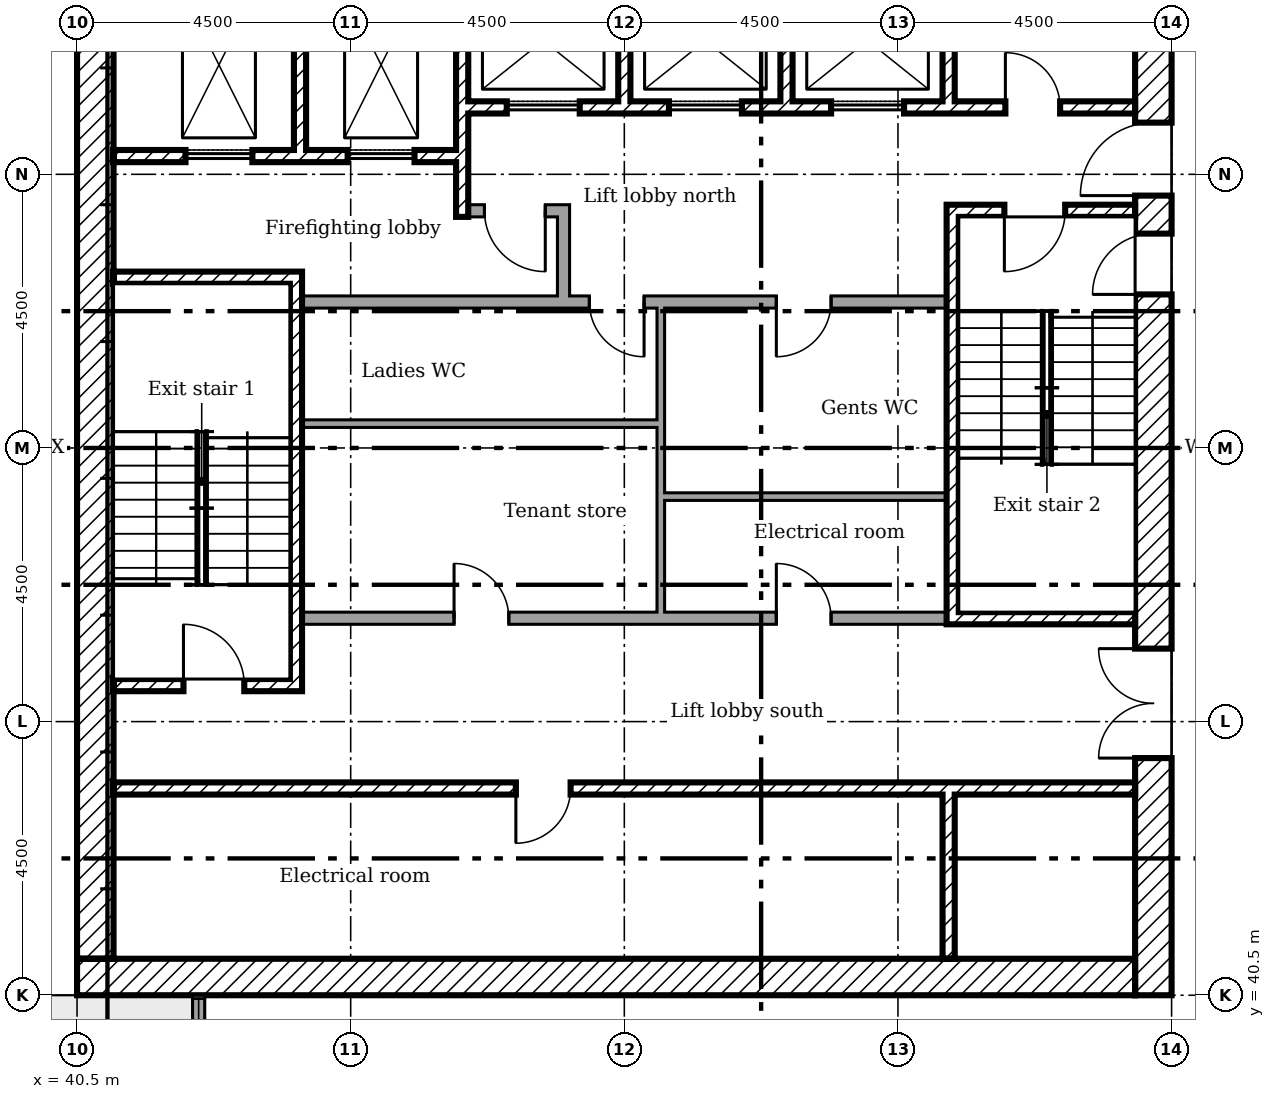
"""IFC4 building model, lengths in metres.
Left out: names, types, materials, properties, quantities, classifications, styles, units other than length and angle.
Written with IfcOpenShell. Run it as: python <this file> out.ifc"""

import sys

from ifc_helpers import new_model, si_unit, direction, frame, frame_2d, origin, place, context, subcontext, project, spatial, rectangle, extrude, element, fill, save


model = new_model("IFC4")
c1 = context("Model", 3, precision=1e-05, world=origin(), true_north=direction((0.0, 1.0)))
c2 = subcontext(c1, "Body", "Model", "MODEL_VIEW")
j1 = project(units=[si_unit("LENGTHUNIT", "METRE"), si_unit("PLANEANGLEUNIT", "RADIAN")], contexts=[c1])
p1 = place(None, origin())
s1 = spatial("IfcSite", under=j1, at=p1, CompositionType="ELEMENT")
p2 = place(p1, origin())
s2 = spatial("IfcBuilding", under=s1, at=p2, CompositionType="ELEMENT")
p3 = place(p2, frame((0.0, 0.0, 190.6)))
s3 = spatial("IfcBuildingStorey", under=s2, at=p3, CompositionType="ELEMENT", Elevation=190.6)
p4 = place(p3, frame((42.5, 40.5, 0.0), z_axis=(0.0, 0.0, 1.0), x_axis=(0.0, -1.0, 0.0)))
e1 = element("IfcWall", 1, at=p4, inside=s3, PredefinedType="ELEMENTEDWALL", context=c2, shape_type="SweptSolid", body=[
    extrude(rectangle(XDim=2.1, YDim=0.2, at=frame_2d((1.05, 0.0))), origin(), (0.0, 0.0, 1.0), 1.8),
])
p5 = place(p3, frame((58.2, 40.5, 0.0), z_axis=(0.0, 0.0, 1.0), x_axis=(0.0, 1.0, 0.0)))
e2 = element("IfcWall", 2, at=p5, inside=s3, PredefinedType="SHEAR", context=c2, shape_type="SweptSolid", body=[
    extrude(rectangle(XDim=18.0, YDim=0.6, at=frame_2d((9.0, 0.0))), origin(), (0.0, 0.0, 1.0), 4.75),
])
p6 = place(p5, frame((13.15, 0.0, 0.0)))
e3 = element("IfcOpeningElement", 3, at=p6, cuts=e2, PredefinedType="OPENING", context=c2, shape_type="SweptSolid", body=[
    extrude(rectangle(XDim=1.2, YDim=2.1, at=frame_2d((0.6, 1.05))), frame((0.0, 0.31, 0.0), z_axis=(0.0, -1.0, 0.0), x_axis=(1.0, 0.0, 0.0)), (0.0, 0.0, 1.0), 0.62),
])
p7 = place(p5, frame((3.9, 0.0, 0.0)))
e4 = element("IfcOpeningElement", 4, at=p7, cuts=e2, PredefinedType="OPENING", context=c2, shape_type="SweptSolid", body=[
    extrude(rectangle(XDim=1.8, YDim=2.1, at=frame_2d((0.9, 1.05))), frame((0.0, 0.31, 0.0), z_axis=(0.0, -1.0, 0.0), x_axis=(1.0, 0.0, 0.0)), (0.0, 0.0, 1.0), 0.62),
])
p8 = place(p5, frame((11.525, 0.0, 0.0)))
e5 = element("IfcOpeningElement", 5, at=p8, cuts=e2, PredefinedType="OPENING", context=c2, shape_type="SweptSolid", body=[
    extrude(rectangle(XDim=1.0, YDim=2.1, at=frame_2d((0.5, 1.05))), frame((0.0, 0.31, 0.0), z_axis=(0.0, -1.0, 0.0), x_axis=(1.0, 0.0, 0.0)), (0.0, 0.0, 1.0), 0.62),
])
p9 = place(p3, frame((40.5, 40.8, 0.0)))
e6 = element("IfcWall", 6, at=p9, inside=s3, PredefinedType="SHEAR", context=c2, shape_type="SweptSolid", body=[
    extrude(rectangle(XDim=17.4, YDim=0.6, at=frame_2d((8.7, 0.0))), origin(), (0.0, 0.0, 1.0), 4.75),
])
p10 = place(p3, frame((40.8, 41.1, 0.0), z_axis=(0.0, 0.0, 1.0), x_axis=(0.0, 1.0, 0.0)))
e7 = element("IfcWall", 7, at=p10, inside=s3, PredefinedType="SHEAR", context=c2, shape_type="SweptSolid", body=[
    extrude(rectangle(XDim=16.8, YDim=0.6, at=frame_2d((8.4, 0.0))), origin(), (0.0, 0.0, 1.0), 4.75),
])
p11 = place(p3, frame((44.167, 57.9, 0.0), z_axis=(0.0, 0.0, 1.0), x_axis=(0.0, -1.0, 0.0)))
e8 = element("IfcWall", 8, at=p11, inside=s3, PredefinedType="SHEAR", context=c2, shape_type="SweptSolid", body=[
    extrude(rectangle(XDim=3.5, YDim=0.2, at=frame_2d((1.75, 0.0))), origin(), (0.0, 0.0, 1.0), 4.75),
])
p12 = place(p3, frame((46.833, 57.9, 0.0), z_axis=(0.0, 0.0, 1.0), x_axis=(0.0, -1.0, 0.0)))
e9 = element("IfcWall", 9, at=p12, inside=s3, PredefinedType="SHEAR", context=c2, shape_type="SweptSolid", body=[
    extrude(rectangle(XDim=4.6, YDim=0.2, at=frame_2d((2.3, 0.0))), origin(), (0.0, 0.0, 1.0), 4.75),
])
for number, where, z_axis, x_axis in (
    (10, (49.5, 57.9, 0.0), (0.0, 0.0, 1.0), (0.0, -1.0, 0.0)),
    (11, (52.167, 57.9, 0.0), (0.0, 0.0, 1.0), (0.0, -1.0, 0.0)),
    (12, (54.833, 57.9, 0.0), (0.0, 0.0, 1.0), (0.0, -1.0, 0.0)),
    (13, (54.833, 41.1, 0.0), (0.0, 0.0, 1.0), (0.0, 1.0, 0.0)),
):
    element("IfcWall", number, at=place(p3, frame(where, z_axis=z_axis, x_axis=x_axis)), inside=s3, PredefinedType="SHEAR", context=c2, shape_type="SweptSolid", body=[
        extrude(rectangle(XDim=2.7, YDim=0.2, at=frame_2d((1.35, 0.0))), origin(), (0.0, 0.0, 1.0), 4.75),
    ])
p13 = place(p3, frame((48.5, 51.9, 0.0), z_axis=(0.0, 0.0, 1.0), x_axis=(0.0, 1.0, 0.0)))
e14 = element("IfcWall", 14, at=p13, inside=s3, PredefinedType="PARTITIONING", context=c2, shape_type="SweptSolid", body=[
    extrude(rectangle(XDim=1.6, YDim=0.2, at=frame_2d((0.8, 0.0))), origin(), (0.0, 0.0, 1.0), 4.75),
])
p14 = place(p3, frame((46.933, 53.4, 0.0)))
e15 = element("IfcWall", 15, at=p14, inside=s3, PredefinedType="PARTITIONING", context=c2, shape_type="SweptSolid", body=[
    extrude(rectangle(XDim=1.467, YDim=0.2, at=frame_2d((0.733, 0.0))), origin(), (0.0, 0.0, 1.0), 4.75),
])
p15 = place(p14, frame((0.267, 0.0, 0.0)))
e16 = element("IfcOpeningElement", 16, at=p15, cuts=e15, PredefinedType="OPENING", context=c2, shape_type="SweptSolid", body=[
    extrude(rectangle(XDim=1.0, YDim=2.1, at=frame_2d((0.5, 1.05))), frame((0.0, 0.11, 0.0), z_axis=(0.0, -1.0, 0.0), x_axis=(1.0, 0.0, 0.0)), (0.0, 0.0, 1.0), 0.22),
])
p16 = place(p3, frame((46.933, 55.1, 0.0)))
e17 = element("IfcWall", 17, at=p16, inside=s3, PredefinedType="SHEAR", context=c2, shape_type="SweptSolid", body=[
    extrude(rectangle(XDim=10.967, YDim=0.2, at=frame_2d((5.483, 0.0))), origin(), (0.0, 0.0, 1.0), 4.75),
])
p17 = place(p16, frame((8.833, 0.0, 0.0)))
e18 = element("IfcOpeningElement", 18, at=p17, cuts=e17, PredefinedType="OPENING", context=c2, shape_type="SweptSolid", body=[
    extrude(rectangle(XDim=0.9, YDim=2.1, at=frame_2d((0.45, 1.05))), frame((0.0, 0.11, 0.0), z_axis=(0.0, -1.0, 0.0), x_axis=(1.0, 0.0, 0.0)), (0.0, 0.0, 1.0), 0.22),
])
p18 = place(p16, frame((0.633, 0.0, 0.0)))
e19 = element("IfcOpeningElement", 19, at=p18, cuts=e17, PredefinedType="OPENING", context=c2, shape_type="SweptSolid", body=[
    extrude(rectangle(XDim=1.2, YDim=2.1, at=frame_2d((0.6, 1.05))), frame((0.0, 0.11, 0.0), z_axis=(0.0, -1.0, 0.0), x_axis=(1.0, 0.0, 0.0)), (0.0, 0.0, 1.0), 0.22),
])
p19 = place(p16, frame((3.3, 0.0, 0.0)))
e20 = element("IfcOpeningElement", 20, at=p19, cuts=e17, PredefinedType="OPENING", context=c2, shape_type="SweptSolid", body=[
    extrude(rectangle(XDim=1.2, YDim=2.1, at=frame_2d((0.6, 1.05))), frame((0.0, 0.11, 0.0), z_axis=(0.0, -1.0, 0.0), x_axis=(1.0, 0.0, 0.0)), (0.0, 0.0, 1.0), 0.22),
])
p20 = place(p16, frame((5.967, 0.0, 0.0)))
e21 = element("IfcOpeningElement", 21, at=p20, cuts=e17, PredefinedType="OPENING", context=c2, shape_type="SweptSolid", body=[
    extrude(rectangle(XDim=1.2, YDim=2.1, at=frame_2d((0.6, 1.05))), frame((0.0, 0.11, 0.0), z_axis=(0.0, -1.0, 0.0), x_axis=(1.0, 0.0, 0.0)), (0.0, 0.0, 1.0), 0.22),
])
p21 = place(p3, frame((41.1, 54.3, 0.0)))
e22 = element("IfcWall", 22, at=p21, inside=s3, PredefinedType="SHEAR", context=c2, shape_type="SweptSolid", body=[
    extrude(rectangle(XDim=5.633, YDim=0.2, at=frame_2d((2.817, 0.0))), origin(), (0.0, 0.0, 1.0), 4.75),
])
p22 = place(p21, frame((1.183, 0.0, 0.0)))
e23 = element("IfcOpeningElement", 23, at=p22, cuts=e22, PredefinedType="OPENING", context=c2, shape_type="SweptSolid", body=[
    extrude(rectangle(XDim=1.1, YDim=2.1, at=frame_2d((0.55, 1.05))), frame((0.0, 0.11, 0.0), z_axis=(0.0, -1.0, 0.0), x_axis=(1.0, 0.0, 0.0)), (0.0, 0.0, 1.0), 0.22),
])
p23 = place(p21, frame((3.85, 0.0, 0.0)))
e24 = element("IfcOpeningElement", 24, at=p23, cuts=e22, PredefinedType="OPENING", context=c2, shape_type="SweptSolid", body=[
    extrude(rectangle(XDim=1.1, YDim=2.1, at=frame_2d((0.55, 1.05))), frame((0.0, 0.11, 0.0), z_axis=(0.0, -1.0, 0.0), x_axis=(1.0, 0.0, 0.0)), (0.0, 0.0, 1.0), 0.22),
])
p24 = place(p3, frame((41.1, 43.9, 0.0)))
e25 = element("IfcWall", 25, at=p24, inside=s3, PredefinedType="SHEAR", context=c2, shape_type="SweptSolid", body=[
    extrude(rectangle(XDim=16.8, YDim=0.2, at=frame_2d((8.4, 0.0))), origin(), (0.0, 0.0, 1.0), 4.75),
])
p25 = place(p24, frame((6.617, 0.0, 0.0)))
e26 = element("IfcOpeningElement", 26, at=p25, cuts=e25, PredefinedType="OPENING", context=c2, shape_type="SweptSolid", body=[
    extrude(rectangle(XDim=0.9, YDim=2.1, at=frame_2d((0.45, 1.05))), frame((0.0, 0.11, 0.0), z_axis=(0.0, -1.0, 0.0), x_axis=(1.0, 0.0, 0.0)), (0.0, 0.0, 1.0), 0.22),
])
p26 = place(p3, frame((44.1, 45.5, 0.0), z_axis=(0.0, 0.0, 1.0), x_axis=(0.0, 1.0, 0.0)))
e27 = element("IfcWall", 27, at=p26, inside=s3, PredefinedType="SHEAR", context=c2, shape_type="SweptSolid", body=[
    extrude(rectangle(XDim=6.9, YDim=0.2, at=frame_2d((3.45, 0.0))), origin(), (0.0, 0.0, 1.0), 4.75),
])
p27 = place(p3, frame((41.1, 52.3, 0.0)))
e28 = element("IfcWall", 28, at=p27, inside=s3, PredefinedType="SHEAR", context=c2, shape_type="SweptSolid", body=[
    extrude(rectangle(XDim=2.9, YDim=0.2, at=frame_2d((1.45, 0.0))), origin(), (0.0, 0.0, 1.0), 4.75),
])
p28 = place(p3, frame((41.1, 45.6, 0.0)))
e29 = element("IfcWall", 29, at=p28, inside=s3, PredefinedType="SHEAR", context=c2, shape_type="SweptSolid", body=[
    extrude(rectangle(XDim=2.9, YDim=0.2, at=frame_2d((1.45, 0.0))), origin(), (0.0, 0.0, 1.0), 4.75),
])
p29 = place(p28, frame((1.15, 0.0, 0.0)))
e30 = element("IfcOpeningElement", 30, at=p29, cuts=e29, PredefinedType="OPENING", context=c2, shape_type="SweptSolid", body=[
    extrude(rectangle(XDim=1.0, YDim=2.1, at=frame_2d((0.5, 1.05))), frame((0.0, 0.11, 0.0), z_axis=(0.0, -1.0, 0.0), x_axis=(1.0, 0.0, 0.0)), (0.0, 0.0, 1.0), 0.22),
])
p30 = place(p3, frame((54.8, 53.4, 0.0)))
e31 = element("IfcWall", 31, at=p30, inside=s3, PredefinedType="SHEAR", context=c2, shape_type="SweptSolid", body=[
    extrude(rectangle(XDim=3.1, YDim=0.2, at=frame_2d((1.55, 0.0))), origin(), (0.0, 0.0, 1.0), 4.75),
])
p31 = place(p30, frame((0.95, 0.0, 0.0)))
e32 = element("IfcOpeningElement", 32, at=p31, cuts=e31, PredefinedType="OPENING", context=c2, shape_type="SweptSolid", body=[
    extrude(rectangle(XDim=1.0, YDim=2.1, at=frame_2d((0.5, 1.05))), frame((0.0, 0.11, 0.0), z_axis=(0.0, -1.0, 0.0), x_axis=(1.0, 0.0, 0.0)), (0.0, 0.0, 1.0), 0.22),
])
p32 = place(p3, frame((54.8, 46.7, 0.0)))
e33 = element("IfcWall", 33, at=p32, inside=s3, PredefinedType="SHEAR", context=c2, shape_type="SweptSolid", body=[
    extrude(rectangle(XDim=3.1, YDim=0.2, at=frame_2d((1.55, 0.0))), origin(), (0.0, 0.0, 1.0), 4.75),
])
p33 = place(p3, frame((54.9, 46.8, 0.0), z_axis=(0.0, 0.0, 1.0), x_axis=(0.0, 1.0, 0.0)))
e34 = element("IfcWall", 34, at=p33, inside=s3, PredefinedType="SHEAR", context=c2, shape_type="SweptSolid", body=[
    extrude(rectangle(XDim=6.5, YDim=0.2, at=frame_2d((3.25, 0.0))), origin(), (0.0, 0.0, 1.0), 4.75),
])
p34 = place(p3, frame((44.2, 51.9, 0.0)))
e35 = element("IfcWall", 35, at=p34, inside=s3, PredefinedType="PARTITIONING", context=c2, shape_type="SweptSolid", body=[
    extrude(rectangle(XDim=10.6, YDim=0.2, at=frame_2d((5.3, 0.0))), origin(), (0.0, 0.0, 1.0), 4.75),
])
p35 = place(p34, frame((4.725, 0.0, 0.0)))
e36 = element("IfcOpeningElement", 36, at=p35, cuts=e35, PredefinedType="OPENING", context=c2, shape_type="SweptSolid", body=[
    extrude(rectangle(XDim=0.9, YDim=2.1, at=frame_2d((0.45, 1.05))), frame((0.0, 0.11, 0.0), z_axis=(0.0, -1.0, 0.0), x_axis=(1.0, 0.0, 0.0)), (0.0, 0.0, 1.0), 0.22),
])
p36 = place(p34, frame((7.8, 0.0, 0.0)))
e37 = element("IfcOpeningElement", 37, at=p36, cuts=e35, PredefinedType="OPENING", context=c2, shape_type="SweptSolid", body=[
    extrude(rectangle(XDim=0.9, YDim=2.1, at=frame_2d((0.45, 1.05))), frame((0.0, 0.11, 0.0), z_axis=(0.0, -1.0, 0.0), x_axis=(1.0, 0.0, 0.0)), (0.0, 0.0, 1.0), 0.22),
])
p37 = place(p3, frame((44.2, 46.7, 0.0)))
e38 = element("IfcWall", 38, at=p37, inside=s3, PredefinedType="PARTITIONING", context=c2, shape_type="SweptSolid", body=[
    extrude(rectangle(XDim=10.6, YDim=0.2, at=frame_2d((5.3, 0.0))), origin(), (0.0, 0.0, 1.0), 4.75),
])
p38 = place(p37, frame((2.5, 0.0, 0.0)))
e39 = element("IfcOpeningElement", 39, at=p38, cuts=e38, PredefinedType="OPENING", context=c2, shape_type="SweptSolid", body=[
    extrude(rectangle(XDim=0.9, YDim=2.1, at=frame_2d((0.45, 1.05))), frame((0.0, 0.11, 0.0), z_axis=(0.0, -1.0, 0.0), x_axis=(1.0, 0.0, 0.0)), (0.0, 0.0, 1.0), 0.22),
])
p39 = place(p37, frame((7.8, 0.0, 0.0)))
e40 = element("IfcOpeningElement", 40, at=p39, cuts=e38, PredefinedType="OPENING", context=c2, shape_type="SweptSolid", body=[
    extrude(rectangle(XDim=0.9, YDim=2.1, at=frame_2d((0.45, 1.05))), frame((0.0, 0.11, 0.0), z_axis=(0.0, -1.0, 0.0), x_axis=(1.0, 0.0, 0.0)), (0.0, 0.0, 1.0), 0.22),
])
p40 = place(p3, frame((50.1, 46.8, 0.0), z_axis=(0.0, 0.0, 1.0), x_axis=(0.0, 1.0, 0.0)))
e41 = element("IfcWall", 41, at=p40, inside=s3, PredefinedType="PARTITIONING", context=c2, shape_type="SweptSolid", body=[
    extrude(rectangle(XDim=1.962, YDim=0.125, at=frame_2d((0.981, 0.0))), origin(), (0.0, 0.0, 1.0), 4.75),
])
p41 = place(p3, frame((54.8, 48.7, 0.0), z_axis=(0.0, 0.0, 1.0), x_axis=(-1.0, 0.0, 0.0)))
e42 = element("IfcWall", 42, at=p41, inside=s3, PredefinedType="PARTITIONING", context=c2, shape_type="SweptSolid", body=[
    extrude(rectangle(XDim=4.637, YDim=0.125, at=frame_2d((2.319, 0.0))), origin(), (0.0, 0.0, 1.0), 4.75),
])
p42 = place(p3, frame((50.1, 48.7, 0.0), z_axis=(0.0, 0.0, 1.0), x_axis=(0.0, 1.0, 0.0)))
e43 = element("IfcWall", 43, at=p42, inside=s3, PredefinedType="PARTITIONING", context=c2, shape_type="SweptSolid", body=[
    extrude(rectangle(XDim=1.262, YDim=0.125, at=frame_2d((0.631, 0.0))), origin(), (0.0, 0.0, 1.0), 4.75),
])
p43 = place(p3, frame((50.038, 49.9, 0.0), z_axis=(0.0, 0.0, 1.0), x_axis=(-1.0, 0.0, 0.0)))
e44 = element("IfcWall", 44, at=p43, inside=s3, PredefinedType="PARTITIONING", context=c2, shape_type="SweptSolid", body=[
    extrude(rectangle(XDim=5.838, YDim=0.125, at=frame_2d((2.919, 0.0))), origin(), (0.0, 0.0, 1.0), 4.75),
])
p44 = place(p3, frame((50.1, 49.9, 0.0), z_axis=(0.0, 0.0, 1.0), x_axis=(0.0, 1.0, 0.0)))
e45 = element("IfcWall", 45, at=p44, inside=s3, PredefinedType="PARTITIONING", context=c2, shape_type="SweptSolid", body=[
    extrude(rectangle(XDim=1.9, YDim=0.125, at=frame_2d((0.95, 0.0))), origin(), (0.0, 0.0, 1.0), 4.75),
])
p45 = place(p6, origin())
e46 = element("IfcDoor", 46, at=p45, inside=s3, OperationType="SINGLE_SWING_RIGHT", PredefinedType="DOOR", context=c2, shape_type="SweptSolid", body=[
    extrude(rectangle(XDim=1.2, YDim=2.1, at=frame_2d((0.6, 1.05))), frame((0.0, 0.025, 0.0), z_axis=(0.0, -1.0, 0.0), x_axis=(1.0, 0.0, 0.0)), (0.0, 0.0, 1.0), 0.05),
])
fill(e3, e46)
p46 = place(p7, origin())
e47 = element("IfcDoor", 47, at=p46, inside=s3, OperationType="DOUBLE_DOOR_SINGLE_SWING", PredefinedType="DOOR", context=c2, shape_type="SweptSolid", body=[
    extrude(rectangle(XDim=1.8, YDim=2.1, at=frame_2d((0.9, 1.05))), frame((0.0, 0.025, 0.0), z_axis=(0.0, -1.0, 0.0), x_axis=(1.0, 0.0, 0.0)), (0.0, 0.0, 1.0), 0.05),
])
fill(e4, e47)
p47 = place(p29, origin())
e48 = element("IfcDoor", 48, at=p47, inside=s3, OperationType="SINGLE_SWING_RIGHT", PredefinedType="DOOR", context=c2, shape_type="SweptSolid", body=[
    extrude(rectangle(XDim=1.0, YDim=2.1, at=frame_2d((0.5, 1.05))), frame((0.0, 0.025, 0.0), z_axis=(0.0, -1.0, 0.0), x_axis=(1.0, 0.0, 0.0)), (0.0, 0.0, 1.0), 0.05),
])
fill(e30, e48)
p48 = place(p31, frame((1.0, 0.0, 0.0), x_axis=(-1.0, 0.0, 0.0)))
e49 = element("IfcDoor", 49, at=p48, inside=s3, OperationType="SINGLE_SWING_LEFT", PredefinedType="DOOR", context=c2, shape_type="SweptSolid", body=[
    extrude(rectangle(XDim=1.0, YDim=2.1, at=frame_2d((0.5, 1.05))), frame((0.0, 0.025, 0.0), z_axis=(0.0, -1.0, 0.0), x_axis=(1.0, 0.0, 0.0)), (0.0, 0.0, 1.0), 0.05),
])
fill(e32, e49)
p49 = place(p8, origin())
e50 = element("IfcDoor", 50, at=p49, inside=s3, OperationType="SINGLE_SWING_RIGHT", PredefinedType="DOOR", context=c2, shape_type="SweptSolid", body=[
    extrude(rectangle(XDim=1.0, YDim=2.1, at=frame_2d((0.5, 1.05))), frame((0.0, 0.025, 0.0), z_axis=(0.0, -1.0, 0.0), x_axis=(1.0, 0.0, 0.0)), (0.0, 0.0, 1.0), 0.05),
])
fill(e5, e50)
p50 = place(p15, frame((1.0, 0.0, 0.0), x_axis=(-1.0, 0.0, 0.0)))
e51 = element("IfcDoor", 51, at=p50, inside=s3, OperationType="SINGLE_SWING_RIGHT", PredefinedType="DOOR", context=c2, shape_type="SweptSolid", body=[
    extrude(rectangle(XDim=1.0, YDim=2.1, at=frame_2d((0.5, 1.05))), frame((0.0, 0.025, 0.0), z_axis=(0.0, -1.0, 0.0), x_axis=(1.0, 0.0, 0.0)), (0.0, 0.0, 1.0), 0.05),
])
fill(e16, e51)
p51 = place(p17, origin())
e52 = element("IfcDoor", 52, at=p51, inside=s3, OperationType="SINGLE_SWING_RIGHT", PredefinedType="DOOR", context=c2, shape_type="SweptSolid", body=[
    extrude(rectangle(XDim=0.9, YDim=2.1, at=frame_2d((0.45, 1.05))), frame((0.0, 0.025, 0.0), z_axis=(0.0, -1.0, 0.0), x_axis=(1.0, 0.0, 0.0)), (0.0, 0.0, 1.0), 0.05),
])
fill(e18, e52)
p52 = place(p25, frame((0.9, 0.0, 0.0), x_axis=(-1.0, 0.0, 0.0)))
e53 = element("IfcDoor", 53, at=p52, inside=s3, OperationType="SINGLE_SWING_LEFT", PredefinedType="DOOR", context=c2, shape_type="SweptSolid", body=[
    extrude(rectangle(XDim=0.9, YDim=2.1, at=frame_2d((0.45, 1.05))), frame((0.0, 0.025, 0.0), z_axis=(0.0, -1.0, 0.0), x_axis=(1.0, 0.0, 0.0)), (0.0, 0.0, 1.0), 0.05),
])
fill(e26, e53)
p53 = place(p38, origin())
e54 = element("IfcDoor", 54, at=p53, inside=s3, OperationType="SINGLE_SWING_RIGHT", PredefinedType="DOOR", context=c2, shape_type="SweptSolid", body=[
    extrude(rectangle(XDim=0.9, YDim=2.1, at=frame_2d((0.45, 1.05))), frame((0.0, 0.025, 0.0), z_axis=(0.0, -1.0, 0.0), x_axis=(1.0, 0.0, 0.0)), (0.0, 0.0, 1.0), 0.05),
])
fill(e39, e54)
p54 = place(p35, frame((0.9, 0.0, 0.0), x_axis=(-1.0, 0.0, 0.0)))
e55 = element("IfcDoor", 55, at=p54, inside=s3, OperationType="SINGLE_SWING_RIGHT", PredefinedType="DOOR", context=c2, shape_type="SweptSolid", body=[
    extrude(rectangle(XDim=0.9, YDim=2.1, at=frame_2d((0.45, 1.05))), frame((0.0, 0.025, 0.0), z_axis=(0.0, -1.0, 0.0), x_axis=(1.0, 0.0, 0.0)), (0.0, 0.0, 1.0), 0.05),
])
fill(e36, e55)
p55 = place(p39, origin())
e56 = element("IfcDoor", 56, at=p55, inside=s3, OperationType="SINGLE_SWING_RIGHT", PredefinedType="DOOR", context=c2, shape_type="SweptSolid", body=[
    extrude(rectangle(XDim=0.9, YDim=2.1, at=frame_2d((0.45, 1.05))), frame((0.0, 0.025, 0.0), z_axis=(0.0, -1.0, 0.0), x_axis=(1.0, 0.0, 0.0)), (0.0, 0.0, 1.0), 0.05),
])
fill(e40, e56)
p56 = place(p36, frame((0.9, 0.0, 0.0), x_axis=(-1.0, 0.0, 0.0)))
e57 = element("IfcDoor", 57, at=p56, inside=s3, OperationType="SINGLE_SWING_LEFT", PredefinedType="DOOR", context=c2, shape_type="SweptSolid", body=[
    extrude(rectangle(XDim=0.9, YDim=2.1, at=frame_2d((0.45, 1.05))), frame((0.0, 0.025, 0.0), z_axis=(0.0, -1.0, 0.0), x_axis=(1.0, 0.0, 0.0)), (0.0, 0.0, 1.0), 0.05),
])
fill(e37, e57)
p57 = place(p22, origin())
e58 = element("IfcDoor", 58, at=p57, inside=s3, OperationType="SLIDING_TO_LEFT", PredefinedType="DOOR", context=c2, shape_type="SweptSolid", body=[
    extrude(rectangle(XDim=1.1, YDim=2.1, at=frame_2d((0.55, 1.05))), frame((0.0, 0.025, 0.0), z_axis=(0.0, -1.0, 0.0), x_axis=(1.0, 0.0, 0.0)), (0.0, 0.0, 1.0), 0.05),
])
fill(e23, e58)
p58 = place(p23, origin())
e59 = element("IfcDoor", 59, at=p58, inside=s3, OperationType="SLIDING_TO_LEFT", PredefinedType="DOOR", context=c2, shape_type="SweptSolid", body=[
    extrude(rectangle(XDim=1.1, YDim=2.1, at=frame_2d((0.55, 1.05))), frame((0.0, 0.025, 0.0), z_axis=(0.0, -1.0, 0.0), x_axis=(1.0, 0.0, 0.0)), (0.0, 0.0, 1.0), 0.05),
])
fill(e24, e59)
p59 = place(p18, origin())
e60 = element("IfcDoor", 60, at=p59, inside=s3, OperationType="SLIDING_TO_LEFT", PredefinedType="DOOR", context=c2, shape_type="SweptSolid", body=[
    extrude(rectangle(XDim=1.2, YDim=2.1, at=frame_2d((0.6, 1.05))), frame((0.0, 0.025, 0.0), z_axis=(0.0, -1.0, 0.0), x_axis=(1.0, 0.0, 0.0)), (0.0, 0.0, 1.0), 0.05),
])
fill(e19, e60)
p60 = place(p19, origin())
e61 = element("IfcDoor", 61, at=p60, inside=s3, OperationType="SLIDING_TO_LEFT", PredefinedType="DOOR", context=c2, shape_type="SweptSolid", body=[
    extrude(rectangle(XDim=1.2, YDim=2.1, at=frame_2d((0.6, 1.05))), frame((0.0, 0.025, 0.0), z_axis=(0.0, -1.0, 0.0), x_axis=(1.0, 0.0, 0.0)), (0.0, 0.0, 1.0), 0.05),
])
fill(e20, e61)
p61 = place(p20, origin())
e62 = element("IfcDoor", 62, at=p61, inside=s3, OperationType="SLIDING_TO_LEFT", PredefinedType="DOOR", context=c2, shape_type="SweptSolid", body=[
    extrude(rectangle(XDim=1.2, YDim=2.1, at=frame_2d((0.6, 1.05))), frame((0.0, 0.025, 0.0), z_axis=(0.0, -1.0, 0.0), x_axis=(1.0, 0.0, 0.0)), (0.0, 0.0, 1.0), 0.05),
])
fill(e21, e62)
save(model, sys.argv[1])
